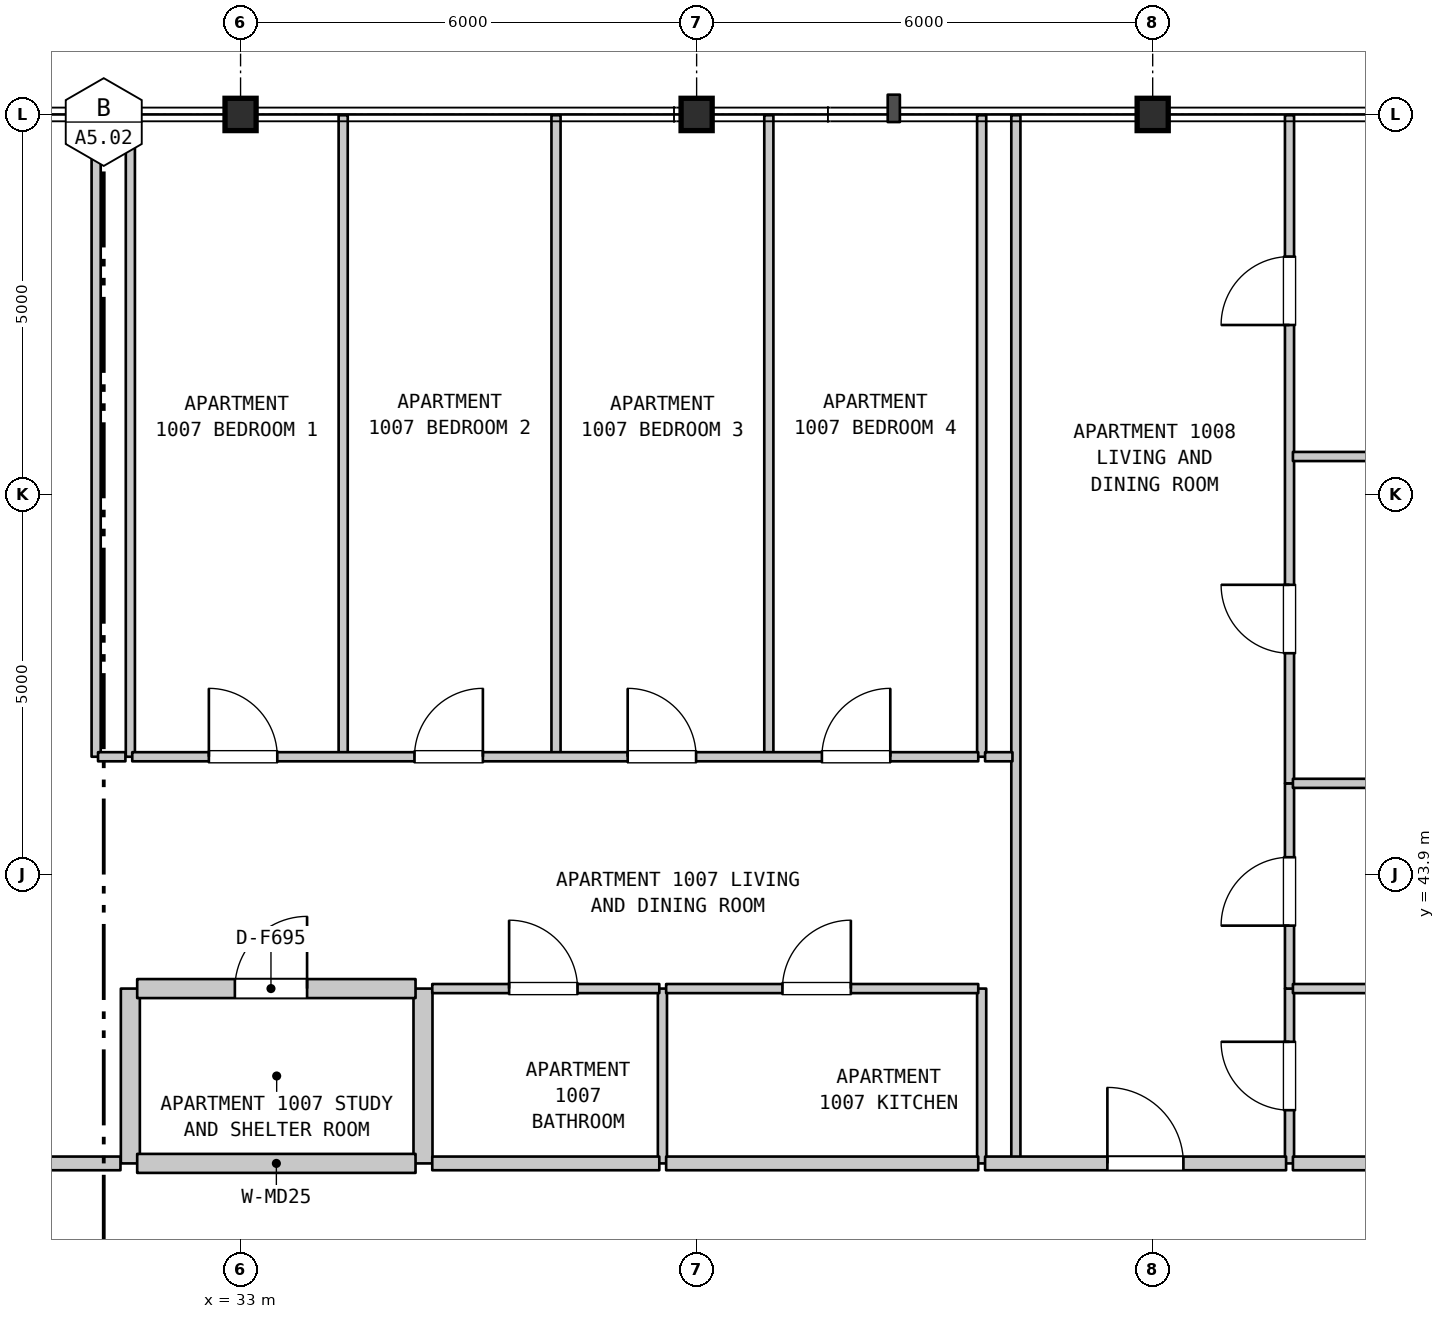
"""IFC4 building model, lengths in metres.
Left out: names, types, materials, properties, quantities, classifications, styles, units other than length and angle.
Written with IfcOpenShell. Run it as: python <this file> out.ifc"""

import sys

from ifc_helpers import new_model, si_unit, direction, frame, frame_2d, origin, origin_2d, place, context, subcontext, project, spatial, rectangle, i_section, extrude, element, fill, save


model = new_model("IFC4")
c1 = context("Model", 3, precision=1e-05, world=origin(), true_north=direction((0.0, 1.0)))
c2 = subcontext(c1, "Body", "Model", "MODEL_VIEW")
j1 = project(units=[si_unit("LENGTHUNIT", "METRE"), si_unit("PLANEANGLEUNIT", "RADIAN")], contexts=[c1])
p1 = place(None, origin())
s1 = spatial("IfcSite", under=j1, at=p1, CompositionType="ELEMENT")
p2 = place(p1, origin())
s2 = spatial("IfcBuilding", under=s1, at=p2, CompositionType="ELEMENT")
p3 = place(p2, frame((0.0, 0.0, 46.2)))
s3 = spatial("IfcBuildingStorey", under=s2, at=p3, CompositionType="ELEMENT", Elevation=46.2)
for number, where, z_axis, x_axis in (
    (1, (33.0, 53.9, 0.0), (0.0, 0.0, 1.0), (1.0, 0.0, 0.0)),
    (2, (39.0, 53.9, 0.0), (0.0, 0.0, 1.0), (1.0, 0.0, 0.0)),
    (3, (45.0, 53.9, 0.0), (0.0, 0.0, 1.0), (1.0, 0.0, 0.0)),
):
    element("IfcColumn", number, at=place(p3, frame(where, z_axis=z_axis, x_axis=x_axis)), inside=s3, PredefinedType="COLUMN", context=c2, shape_type="SweptSolid", body=[
        extrude(i_section(OverallWidth=0.409, OverallDepth=0.425, WebThickness=0.032, FlangeThickness=0.052, FilletRadius=0.015, at=origin_2d()), origin(), (0.0, 0.0, 1.0), 3.7),
    ])
p4 = place(p3, frame((31.1, 45.45, 0.0), z_axis=(0.0, 0.0, 1.0), x_axis=(0.0, 1.0, 0.0)))
e4 = element("IfcWall", 4, at=p4, inside=s3, PredefinedType="PARTITIONING", context=c2, shape_type="SweptSolid", body=[
    extrude(rectangle(XDim=8.44, YDim=0.12, at=frame_2d((4.22, 0.0))), origin(), (0.0, 0.0, 1.0), 3.385),
])
p5 = place(p3, frame((31.55, 40.1, 0.0), z_axis=(0.0, 0.0, 1.0), x_axis=(0.0, 1.0, 0.0)))
e5 = element("IfcWall", 5, at=p5, inside=s3, PredefinedType="STANDARD", context=c2, shape_type="SweptSolid", body=[
    extrude(rectangle(XDim=2.3, YDim=0.25, at=frame_2d((1.15, 0.0))), origin(), (0.0, 0.0, 1.0), 3.385),
])
for number, where, z_axis, x_axis in (
    (6, (31.55, 45.45, 0.0), (0.0, 0.0, 1.0), (0.0, 1.0, 0.0)),
    (7, (34.35, 45.45, 0.0), (0.0, 0.0, 1.0), (0.0, 1.0, 0.0)),
):
    element("IfcWall", number, at=place(p3, frame(where, z_axis=z_axis, x_axis=x_axis)), inside=s3, PredefinedType="PARTITIONING", context=c2, shape_type="SweptSolid", body=[
        extrude(rectangle(XDim=8.44, YDim=0.12, at=frame_2d((4.22, 0.0))), origin(), (0.0, 0.0, 1.0), 3.385),
    ])
p6 = place(p3, frame((35.4, 40.1, 0.0), z_axis=(0.0, 0.0, 1.0), x_axis=(0.0, 1.0, 0.0)))
e8 = element("IfcWall", 8, at=p6, inside=s3, PredefinedType="STANDARD", context=c2, shape_type="SweptSolid", body=[
    extrude(rectangle(XDim=2.3, YDim=0.25, at=frame_2d((1.15, 0.0))), origin(), (0.0, 0.0, 1.0), 3.385),
])
p7 = place(p3, frame((37.15, 45.45, 0.0), z_axis=(0.0, 0.0, 1.0), x_axis=(0.0, 1.0, 0.0)))
e9 = element("IfcWall", 9, at=p7, inside=s3, PredefinedType="PARTITIONING", context=c2, shape_type="SweptSolid", body=[
    extrude(rectangle(XDim=8.44, YDim=0.12, at=frame_2d((4.22, 0.0))), origin(), (0.0, 0.0, 1.0), 3.385),
])
p8 = place(p3, frame((38.55, 40.1, 0.0), z_axis=(0.0, 0.0, 1.0), x_axis=(0.0, 1.0, 0.0)))
e10 = element("IfcWall", 10, at=p8, inside=s3, PredefinedType="PARTITIONING", context=c2, shape_type="SweptSolid", body=[
    extrude(rectangle(XDim=2.3, YDim=0.12, at=frame_2d((1.15, 0.0))), origin(), (0.0, 0.0, 1.0), 3.385),
])
p9 = place(p3, frame((39.95, 45.45, 0.0), z_axis=(0.0, 0.0, 1.0), x_axis=(0.0, 1.0, 0.0)))
e11 = element("IfcWall", 11, at=p9, inside=s3, PredefinedType="PARTITIONING", context=c2, shape_type="SweptSolid", body=[
    extrude(rectangle(XDim=8.44, YDim=0.12, at=frame_2d((4.22, 0.0))), origin(), (0.0, 0.0, 1.0), 3.385),
])
p10 = place(p3, frame((42.75, 40.1, 0.0), z_axis=(0.0, 0.0, 1.0), x_axis=(0.0, 1.0, 0.0)))
e12 = element("IfcWall", 12, at=p10, inside=s3, PredefinedType="PARTITIONING", context=c2, shape_type="SweptSolid", body=[
    extrude(rectangle(XDim=2.3, YDim=0.12, at=frame_2d((1.15, 0.0))), origin(), (0.0, 0.0, 1.0), 3.385),
])
p11 = place(p3, frame((42.75, 45.45, 0.0), z_axis=(0.0, 0.0, 1.0), x_axis=(0.0, 1.0, 0.0)))
e13 = element("IfcWall", 13, at=p11, inside=s3, PredefinedType="PARTITIONING", context=c2, shape_type="SweptSolid", body=[
    extrude(rectangle(XDim=8.44, YDim=0.12, at=frame_2d((4.22, 0.0))), origin(), (0.0, 0.0, 1.0), 3.385),
])
p12 = place(p3, frame((43.2, 40.1, 0.0), z_axis=(0.0, 0.0, 1.0), x_axis=(0.0, 1.0, 0.0)))
e14 = element("IfcWall", 14, at=p12, inside=s3, PredefinedType="PARTITIONING", context=c2, shape_type="SweptSolid", body=[
    extrude(rectangle(XDim=13.79, YDim=0.12, at=frame_2d((6.895, 0.0))), origin(), (0.0, 0.0, 1.0), 3.385),
])
p13 = place(p3, frame((46.8, 40.1, 0.0), z_axis=(0.0, 0.0, 1.0), x_axis=(0.0, 1.0, 0.0)))
e15 = element("IfcWall", 15, at=p13, inside=s3, PredefinedType="PARTITIONING", context=c2, shape_type="SweptSolid", body=[
    extrude(rectangle(XDim=2.3, YDim=0.12, at=frame_2d((1.15, 0.0))), origin(), (0.0, 0.0, 1.0), 3.385),
])
p14 = place(p13, frame((0.7, 0.0, 0.0)))
e16 = element("IfcOpeningElement", 16, at=p14, cuts=e15, PredefinedType="OPENING", context=c2, shape_type="SweptSolid", body=[
    extrude(rectangle(XDim=0.9, YDim=2.15, at=frame_2d((0.45, 1.075))), frame((0.0, 0.07, 0.0), z_axis=(0.0, -1.0, 0.0), x_axis=(1.0, 0.0, 0.0)), (0.0, 0.0, 1.0), 0.14),
])
p15 = place(p3, frame((46.8, 42.4, 0.0), z_axis=(0.0, 0.0, 1.0), x_axis=(0.0, 1.0, 0.0)))
e17 = element("IfcWall", 17, at=p15, inside=s3, PredefinedType="PARTITIONING", context=c2, shape_type="SweptSolid", body=[
    extrude(rectangle(XDim=2.7, YDim=0.12, at=frame_2d((1.35, 0.0))), origin(), (0.0, 0.0, 1.0), 3.385),
])
p16 = place(p15, frame((0.828, 0.0, 0.0)))
e18 = element("IfcOpeningElement", 18, at=p16, cuts=e17, PredefinedType="OPENING", context=c2, shape_type="SweptSolid", body=[
    extrude(rectangle(XDim=0.9, YDim=2.1, at=frame_2d((0.45, 1.05))), frame((0.0, 0.07, 0.0), z_axis=(0.0, -1.0, 0.0), x_axis=(1.0, 0.0, 0.0)), (0.0, 0.0, 1.0), 0.14),
])
p17 = place(p3, frame((46.8, 45.1, 0.0), z_axis=(0.0, 0.0, 1.0), x_axis=(0.0, 1.0, 0.0)))
e19 = element("IfcWall", 19, at=p17, inside=s3, PredefinedType="PARTITIONING", context=c2, shape_type="SweptSolid", body=[
    extrude(rectangle(XDim=8.79, YDim=0.12, at=frame_2d((4.395, 0.0))), origin(), (0.0, 0.0, 1.0), 3.385),
])
p18 = place(p17, frame((1.712, 0.0, 0.0)))
e20 = element("IfcOpeningElement", 20, at=p18, cuts=e19, PredefinedType="OPENING", context=c2, shape_type="SweptSolid", body=[
    extrude(rectangle(XDim=0.9, YDim=2.15, at=frame_2d((0.45, 1.075))), frame((0.0, 0.07, 0.0), z_axis=(0.0, -1.0, 0.0), x_axis=(1.0, 0.0, 0.0)), (0.0, 0.0, 1.0), 0.14),
])
p19 = place(p17, frame((6.03, 0.0, 0.0)))
e21 = element("IfcOpeningElement", 21, at=p19, cuts=e19, PredefinedType="OPENING", context=c2, shape_type="SweptSolid", body=[
    extrude(rectangle(XDim=0.9, YDim=2.15, at=frame_2d((0.45, 1.075))), frame((0.0, 0.07, 0.0), z_axis=(0.0, -1.0, 0.0), x_axis=(1.0, 0.0, 0.0)), (0.0, 0.0, 1.0), 0.14),
])
p20 = place(p3, frame((21.075, 40.1, 0.0), z_axis=(0.0, 0.0, 1.0), x_axis=(1.0, 0.0, 0.0)))
e22 = element("IfcWall", 22, at=p20, inside=s3, PredefinedType="STANDARD", context=c2, shape_type="SweptSolid", body=[
    extrude(rectangle(XDim=10.345, YDim=0.18, at=frame_2d((5.172, 0.0))), origin(), (0.0, 0.0, 1.0), 3.385),
])
p21 = place(p20, frame((2.035, 0.0, 0.0)))
e23 = element("IfcOpeningElement", 23, at=p21, cuts=e22, PredefinedType="OPENING", context=c2, shape_type="SweptSolid", body=[
    extrude(rectangle(XDim=1.0, YDim=2.15, at=frame_2d((0.5, 1.075))), frame((0.0, 0.1, 0.0), z_axis=(0.0, -1.0, 0.0), x_axis=(1.0, 0.0, 0.0)), (0.0, 0.0, 1.0), 0.2),
])
p22 = place(p20, frame((7.235, 0.0, 0.0)))
e24 = element("IfcOpeningElement", 24, at=p22, cuts=e22, PredefinedType="OPENING", context=c2, shape_type="SweptSolid", body=[
    extrude(rectangle(XDim=1.0, YDim=2.15, at=frame_2d((0.5, 1.075))), frame((0.0, 0.1, 0.0), z_axis=(0.0, -1.0, 0.0), x_axis=(1.0, 0.0, 0.0)), (0.0, 0.0, 1.0), 0.2),
])
p23 = place(p3, frame((31.64, 40.1, 0.0), z_axis=(0.0, 0.0, 1.0), x_axis=(1.0, 0.0, 0.0)))
e25 = element("IfcWall", 25, at=p23, inside=s3, PredefinedType="STANDARD", context=c2, shape_type="SweptSolid", body=[
    extrude(rectangle(XDim=3.662, YDim=0.25, at=frame_2d((1.831, 0.0))), origin(), (0.0, 0.0, 1.0), 3.385),
])
p24 = place(p3, frame((35.522, 40.1, 0.0), z_axis=(0.0, 0.0, 1.0), x_axis=(1.0, 0.0, 0.0)))
e26 = element("IfcWall", 26, at=p24, inside=s3, PredefinedType="STANDARD", context=c2, shape_type="SweptSolid", body=[
    extrude(rectangle(XDim=2.987, YDim=0.18, at=frame_2d((1.494, 0.0))), origin(), (0.0, 0.0, 1.0), 3.385),
])
p25 = place(p3, frame((38.599, 40.1, 0.0), z_axis=(0.0, 0.0, 1.0), x_axis=(1.0, 0.0, 0.0)))
e27 = element("IfcWall", 27, at=p25, inside=s3, PredefinedType="STANDARD", context=c2, shape_type="SweptSolid", body=[
    extrude(rectangle(XDim=4.106, YDim=0.18, at=frame_2d((2.053, 0.0))), origin(), (0.0, 0.0, 1.0), 3.385),
])
p26 = place(p3, frame((42.795, 40.1, 0.0), z_axis=(0.0, 0.0, 1.0), x_axis=(1.0, 0.0, 0.0)))
e28 = element("IfcWall", 28, at=p26, inside=s3, PredefinedType="STANDARD", context=c2, shape_type="SweptSolid", body=[
    extrude(rectangle(XDim=3.96, YDim=0.18, at=frame_2d((1.98, 0.0))), origin(), (0.0, 0.0, 1.0), 3.385),
])
p27 = place(p26, frame((1.609, 0.0, 0.0)))
e29 = element("IfcOpeningElement", 29, at=p27, cuts=e28, PredefinedType="OPENING", context=c2, shape_type="SweptSolid", body=[
    extrude(rectangle(XDim=1.0, YDim=2.15, at=frame_2d((0.5, 1.075))), frame((0.0, 0.1, 0.0), z_axis=(0.0, -1.0, 0.0), x_axis=(1.0, 0.0, 0.0)), (0.0, 0.0, 1.0), 0.2),
])
p28 = place(p3, frame((46.845, 40.1, 0.0), z_axis=(0.0, 0.0, 1.0), x_axis=(1.0, 0.0, 0.0)))
e30 = element("IfcWall", 30, at=p28, inside=s3, PredefinedType="STANDARD", context=c2, shape_type="SweptSolid", body=[
    extrude(rectangle(XDim=5.34, YDim=0.18, at=frame_2d((2.67, 0.0))), origin(), (0.0, 0.0, 1.0), 3.385),
])
p29 = place(p3, frame((31.64, 42.4, 0.0), z_axis=(0.0, 0.0, 1.0), x_axis=(1.0, 0.0, 0.0)))
e31 = element("IfcWall", 31, at=p29, inside=s3, PredefinedType="STANDARD", context=c2, shape_type="SweptSolid", body=[
    extrude(rectangle(XDim=3.662, YDim=0.25, at=frame_2d((1.831, 0.0))), origin(), (0.0, 0.0, 1.0), 3.385),
])
p30 = place(p29, frame((1.285, 0.0, 0.0)))
e32 = element("IfcOpeningElement", 32, at=p30, cuts=e31, PredefinedType="OPENING", context=c2, shape_type="SweptSolid", body=[
    extrude(rectangle(XDim=0.95, YDim=2.15, at=frame_2d((0.475, 1.075))), frame((0.0, 0.135, 0.0), z_axis=(0.0, -1.0, 0.0), x_axis=(1.0, 0.0, 0.0)), (0.0, 0.0, 1.0), 0.27),
])
p31 = place(p3, frame((35.522, 42.4, 0.0), z_axis=(0.0, 0.0, 1.0), x_axis=(1.0, 0.0, 0.0)))
e33 = element("IfcWall", 33, at=p31, inside=s3, PredefinedType="PARTITIONING", context=c2, shape_type="SweptSolid", body=[
    extrude(rectangle(XDim=2.987, YDim=0.12, at=frame_2d((1.494, 0.0))), origin(), (0.0, 0.0, 1.0), 3.385),
])
p32 = place(p31, frame((1.011, 0.0, 0.0)))
e34 = element("IfcOpeningElement", 34, at=p32, cuts=e33, PredefinedType="OPENING", context=c2, shape_type="SweptSolid", body=[
    extrude(rectangle(XDim=0.9, YDim=2.1, at=frame_2d((0.45, 1.05))), frame((0.0, 0.07, 0.0), z_axis=(0.0, -1.0, 0.0), x_axis=(1.0, 0.0, 0.0)), (0.0, 0.0, 1.0), 0.14),
])
p33 = place(p3, frame((38.599, 42.4, 0.0), z_axis=(0.0, 0.0, 1.0), x_axis=(1.0, 0.0, 0.0)))
e35 = element("IfcWall", 35, at=p33, inside=s3, PredefinedType="PARTITIONING", context=c2, shape_type="SweptSolid", body=[
    extrude(rectangle(XDim=4.106, YDim=0.12, at=frame_2d((2.053, 0.0))), origin(), (0.0, 0.0, 1.0), 3.385),
])
p34 = place(p33, frame((1.53, 0.0, 0.0)))
e36 = element("IfcOpeningElement", 36, at=p34, cuts=e35, PredefinedType="OPENING", context=c2, shape_type="SweptSolid", body=[
    extrude(rectangle(XDim=0.9, YDim=2.15, at=frame_2d((0.45, 1.075))), frame((0.0, 0.07, 0.0), z_axis=(0.0, -1.0, 0.0), x_axis=(1.0, 0.0, 0.0)), (0.0, 0.0, 1.0), 0.14),
])
for number, where, z_axis, x_axis in (
    (37, (46.845, 42.4, 0.0), (0.0, 0.0, 1.0), (1.0, 0.0, 0.0)),
    (38, (46.845, 45.1, 0.0), (0.0, 0.0, 1.0), (1.0, 0.0, 0.0)),
):
    element("IfcWall", number, at=place(p3, frame(where, z_axis=z_axis, x_axis=x_axis)), inside=s3, PredefinedType="PARTITIONING", context=c2, shape_type="SweptSolid", body=[
        extrude(rectangle(XDim=5.34, YDim=0.12, at=frame_2d((2.67, 0.0))), origin(), (0.0, 0.0, 1.0), 3.385),
    ])
p35 = place(p3, frame((31.125, 45.45, 0.0), z_axis=(0.0, 0.0, 1.0), x_axis=(1.0, 0.0, 0.0)))
e39 = element("IfcWall", 39, at=p35, inside=s3, PredefinedType="PARTITIONING", context=c2, shape_type="SweptSolid", body=[
    extrude(rectangle(XDim=0.36, YDim=0.12, at=frame_2d((0.18, 0.0))), origin(), (0.0, 0.0, 1.0), 3.385),
])
p36 = place(p3, frame((31.575, 45.45, 0.0), z_axis=(0.0, 0.0, 1.0), x_axis=(1.0, 0.0, 0.0)))
e40 = element("IfcWall", 40, at=p36, inside=s3, PredefinedType="PARTITIONING", context=c2, shape_type="SweptSolid", body=[
    extrude(rectangle(XDim=11.13, YDim=0.12, at=frame_2d((5.565, 0.0))), origin(), (0.0, 0.0, 1.0), 3.385),
])
p37 = place(p36, frame((1.008, 0.0, 0.0)))
e41 = element("IfcOpeningElement", 41, at=p37, cuts=e40, PredefinedType="OPENING", context=c2, shape_type="SweptSolid", body=[
    extrude(rectangle(XDim=0.9, YDim=2.15, at=frame_2d((0.45, 1.075))), frame((0.0, 0.07, 0.0), z_axis=(0.0, -1.0, 0.0), x_axis=(1.0, 0.0, 0.0)), (0.0, 0.0, 1.0), 0.14),
])
p38 = place(p36, frame((3.713, 0.0, 0.0)))
e42 = element("IfcOpeningElement", 42, at=p38, cuts=e40, PredefinedType="OPENING", context=c2, shape_type="SweptSolid", body=[
    extrude(rectangle(XDim=0.9, YDim=2.15, at=frame_2d((0.45, 1.075))), frame((0.0, 0.07, 0.0), z_axis=(0.0, -1.0, 0.0), x_axis=(1.0, 0.0, 0.0)), (0.0, 0.0, 1.0), 0.14),
])
p39 = place(p36, frame((6.518, 0.0, 0.0)))
e43 = element("IfcOpeningElement", 43, at=p39, cuts=e40, PredefinedType="OPENING", context=c2, shape_type="SweptSolid", body=[
    extrude(rectangle(XDim=0.9, YDim=2.15, at=frame_2d((0.45, 1.075))), frame((0.0, 0.07, 0.0), z_axis=(0.0, -1.0, 0.0), x_axis=(1.0, 0.0, 0.0)), (0.0, 0.0, 1.0), 0.14),
])
p40 = place(p36, frame((9.073, 0.0, 0.0)))
e44 = element("IfcOpeningElement", 44, at=p40, cuts=e40, PredefinedType="OPENING", context=c2, shape_type="SweptSolid", body=[
    extrude(rectangle(XDim=0.9, YDim=2.15, at=frame_2d((0.45, 1.075))), frame((0.0, 0.07, 0.0), z_axis=(0.0, -1.0, 0.0), x_axis=(1.0, 0.0, 0.0)), (0.0, 0.0, 1.0), 0.14),
])
p41 = place(p3, frame((42.795, 45.45, 0.0), z_axis=(0.0, 0.0, 1.0), x_axis=(1.0, 0.0, 0.0)))
e45 = element("IfcWall", 45, at=p41, inside=s3, PredefinedType="PARTITIONING", context=c2, shape_type="SweptSolid", body=[
    extrude(rectangle(XDim=0.36, YDim=0.12, at=frame_2d((0.18, 0.0))), origin(), (0.0, 0.0, 1.0), 3.385),
])
p42 = place(p3, frame((46.845, 49.4, 0.0), z_axis=(0.0, 0.0, 1.0), x_axis=(1.0, 0.0, 0.0)))
e46 = element("IfcWall", 46, at=p42, inside=s3, PredefinedType="PARTITIONING", context=c2, shape_type="SweptSolid", body=[
    extrude(rectangle(XDim=5.34, YDim=0.12, at=frame_2d((2.67, 0.0))), origin(), (0.0, 0.0, 1.0), 3.385),
])
p43 = place(p14, origin())
e47 = element("IfcDoor", 47, at=p43, inside=s3, OperationType="SINGLE_SWING_RIGHT", PredefinedType="DOOR", context=c2, shape_type="SweptSolid", body=[
    extrude(rectangle(XDim=0.9, YDim=2.15, at=frame_2d((0.45, 1.075))), frame((0.0, 0.025, 0.0), z_axis=(0.0, -1.0, 0.0), x_axis=(1.0, 0.0, 0.0)), (0.0, 0.0, 1.0), 0.05),
])
fill(e16, e47)
p44 = place(p16, origin())
e48 = element("IfcDoor", 48, at=p44, inside=s3, OperationType="SINGLE_SWING_LEFT", PredefinedType="DOOR", context=c2, shape_type="SweptSolid", body=[
    extrude(rectangle(XDim=0.9, YDim=2.1, at=frame_2d((0.45, 1.05))), frame((0.0, 0.025, 0.0), z_axis=(0.0, -1.0, 0.0), x_axis=(1.0, 0.0, 0.0)), (0.0, 0.0, 1.0), 0.05),
])
fill(e18, e48)
p45 = place(p18, origin())
e49 = element("IfcDoor", 49, at=p45, inside=s3, OperationType="SINGLE_SWING_RIGHT", PredefinedType="DOOR", context=c2, shape_type="SweptSolid", body=[
    extrude(rectangle(XDim=0.9, YDim=2.15, at=frame_2d((0.45, 1.075))), frame((0.0, 0.025, 0.0), z_axis=(0.0, -1.0, 0.0), x_axis=(1.0, 0.0, 0.0)), (0.0, 0.0, 1.0), 0.05),
])
fill(e20, e49)
p46 = place(p19, origin())
e50 = element("IfcDoor", 50, at=p46, inside=s3, OperationType="SINGLE_SWING_LEFT", PredefinedType="DOOR", context=c2, shape_type="SweptSolid", body=[
    extrude(rectangle(XDim=0.9, YDim=2.15, at=frame_2d((0.45, 1.075))), frame((0.0, 0.025, 0.0), z_axis=(0.0, -1.0, 0.0), x_axis=(1.0, 0.0, 0.0)), (0.0, 0.0, 1.0), 0.05),
])
fill(e21, e50)
p47 = place(p27, origin())
e51 = element("IfcDoor", 51, at=p47, inside=s3, OperationType="SINGLE_SWING_LEFT", PredefinedType="DOOR", context=c2, shape_type="SweptSolid", body=[
    extrude(rectangle(XDim=1.0, YDim=2.15, at=frame_2d((0.5, 1.075))), frame((0.0, 0.025, 0.0), z_axis=(0.0, -1.0, 0.0), x_axis=(1.0, 0.0, 0.0)), (0.0, 0.0, 1.0), 0.05),
])
fill(e29, e51)
p48 = place(p30, origin())
e52 = element("IfcDoor", 52, at=p48, inside=s3, OperationType="SINGLE_SWING_RIGHT", PredefinedType="DOOR", context=c2, shape_type="SweptSolid", body=[
    extrude(rectangle(XDim=0.95, YDim=2.15, at=frame_2d((0.475, 1.075))), frame((0.0, 0.025, 0.0), z_axis=(0.0, -1.0, 0.0), x_axis=(1.0, 0.0, 0.0)), (0.0, 0.0, 1.0), 0.05),
])
fill(e32, e52)
p49 = place(p32, origin())
e53 = element("IfcDoor", 53, at=p49, inside=s3, OperationType="SINGLE_SWING_LEFT", PredefinedType="DOOR", context=c2, shape_type="SweptSolid", body=[
    extrude(rectangle(XDim=0.9, YDim=2.1, at=frame_2d((0.45, 1.05))), frame((0.0, 0.025, 0.0), z_axis=(0.0, -1.0, 0.0), x_axis=(1.0, 0.0, 0.0)), (0.0, 0.0, 1.0), 0.05),
])
fill(e34, e53)
p50 = place(p34, origin())
e54 = element("IfcDoor", 54, at=p50, inside=s3, OperationType="SINGLE_SWING_RIGHT", PredefinedType="DOOR", context=c2, shape_type="SweptSolid", body=[
    extrude(rectangle(XDim=0.9, YDim=2.15, at=frame_2d((0.45, 1.075))), frame((0.0, 0.025, 0.0), z_axis=(0.0, -1.0, 0.0), x_axis=(1.0, 0.0, 0.0)), (0.0, 0.0, 1.0), 0.05),
])
fill(e36, e54)
p51 = place(p37, origin())
e55 = element("IfcDoor", 55, at=p51, inside=s3, OperationType="SINGLE_SWING_LEFT", PredefinedType="DOOR", context=c2, shape_type="SweptSolid", body=[
    extrude(rectangle(XDim=0.9, YDim=2.15, at=frame_2d((0.45, 1.075))), frame((0.0, 0.025, 0.0), z_axis=(0.0, -1.0, 0.0), x_axis=(1.0, 0.0, 0.0)), (0.0, 0.0, 1.0), 0.05),
])
fill(e41, e55)
p52 = place(p38, origin())
e56 = element("IfcDoor", 56, at=p52, inside=s3, OperationType="SINGLE_SWING_RIGHT", PredefinedType="DOOR", context=c2, shape_type="SweptSolid", body=[
    extrude(rectangle(XDim=0.9, YDim=2.15, at=frame_2d((0.45, 1.075))), frame((0.0, 0.025, 0.0), z_axis=(0.0, -1.0, 0.0), x_axis=(1.0, 0.0, 0.0)), (0.0, 0.0, 1.0), 0.05),
])
fill(e42, e56)
p53 = place(p39, origin())
e57 = element("IfcDoor", 57, at=p53, inside=s3, OperationType="SINGLE_SWING_LEFT", PredefinedType="DOOR", context=c2, shape_type="SweptSolid", body=[
    extrude(rectangle(XDim=0.9, YDim=2.15, at=frame_2d((0.45, 1.075))), frame((0.0, 0.025, 0.0), z_axis=(0.0, -1.0, 0.0), x_axis=(1.0, 0.0, 0.0)), (0.0, 0.0, 1.0), 0.05),
])
fill(e43, e57)
p54 = place(p40, origin())
e58 = element("IfcDoor", 58, at=p54, inside=s3, OperationType="SINGLE_SWING_RIGHT", PredefinedType="DOOR", context=c2, shape_type="SweptSolid", body=[
    extrude(rectangle(XDim=0.9, YDim=2.15, at=frame_2d((0.45, 1.075))), frame((0.0, 0.025, 0.0), z_axis=(0.0, -1.0, 0.0), x_axis=(1.0, 0.0, 0.0)), (0.0, 0.0, 1.0), 0.05),
])
fill(e44, e58)
save(model, sys.argv[1])
